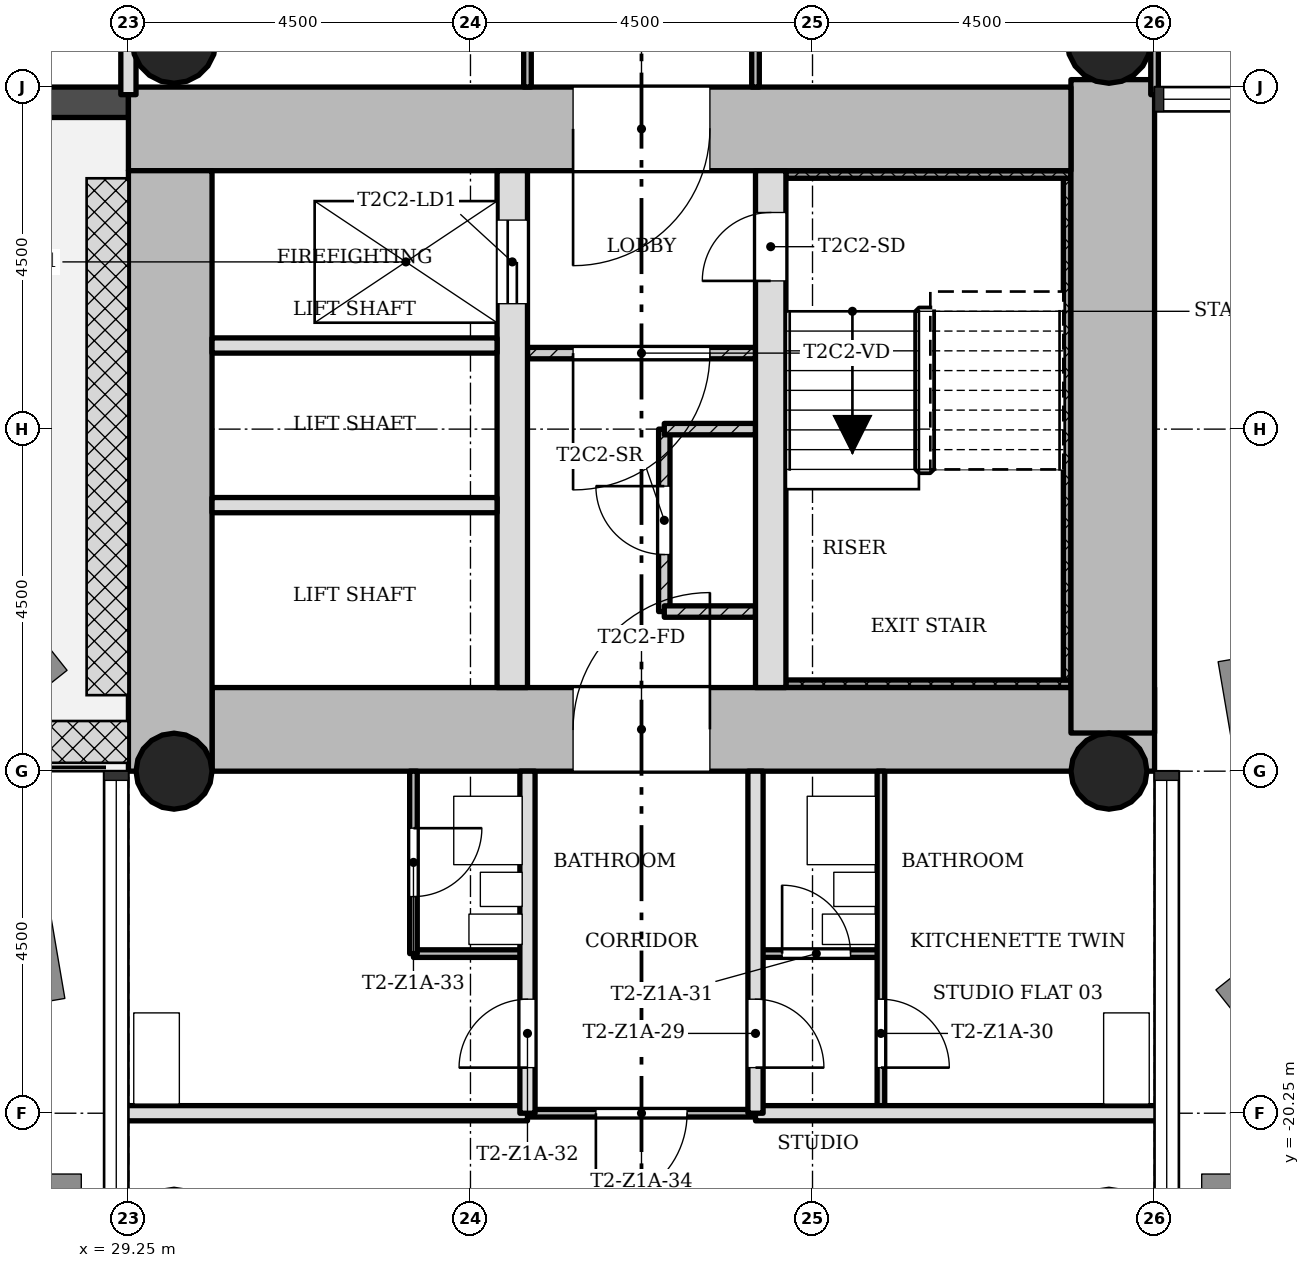
"""IFC4 building model, lengths in metres.
Left out: names, types, materials, properties, quantities, classifications, styles, units other than length and angle.
Written with IfcOpenShell. Run it as: python <this file> out.ifc"""

import sys

from ifc_helpers import new_model, si_unit, direction, frame, frame_2d, origin, origin_2d, place, context, subcontext, project, spatial, rectangle, hollow_circle, extrude, element, fill, save


model = new_model("IFC4")
c1 = context("Model", 3, precision=1e-05, world=origin(), true_north=direction((0.0, 1.0)))
c2 = subcontext(c1, "Body", "Model", "MODEL_VIEW")
j1 = project(units=[si_unit("LENGTHUNIT", "METRE"), si_unit("PLANEANGLEUNIT", "RADIAN")], contexts=[c1])
p1 = place(None, origin())
s1 = spatial("IfcSite", under=j1, at=p1, CompositionType="ELEMENT")
p2 = place(p1, origin())
s2 = spatial("IfcBuilding", under=s1, at=p2, CompositionType="ELEMENT")
p3 = place(p2, frame((0.0, 0.0, 24.5)))
s3 = spatial("IfcBuildingStorey", under=s2, at=p3, CompositionType="ELEMENT", Elevation=24.5)
p4 = place(p3, frame((30.35, -15.2, 0.0), z_axis=(0.0, 0.0, 1.0), x_axis=(1.0, 0.0, 0.0)))
e1 = element("IfcWall", 1, at=p4, inside=s3, PredefinedType="SHEAR", context=c2, shape_type="SweptSolid", body=[
    extrude(rectangle(XDim=12.4, YDim=1.1, at=frame_2d((6.2, 0.0))), origin(), (0.0, 0.0, 1.0), 3.4),
])
p5 = place(p4, frame((4.75, 0.0, 0.0)))
e2 = element("IfcOpeningElement", 2, at=p5, cuts=e1, PredefinedType="OPENING", context=c2, shape_type="SweptSolid", body=[
    extrude(rectangle(XDim=1.8, YDim=2.1, at=frame_2d((0.9, 1.05))), frame((0.0, 0.56, 0.0), z_axis=(0.0, -1.0, 0.0), x_axis=(1.0, 0.0, 0.0)), (0.0, 0.0, 1.0), 1.12),
])
p6 = place(p3, frame((42.2, -15.248, 0.0), z_axis=(0.0, 0.0, 1.0), x_axis=(0.0, 1.0, 0.0)))
e3 = element("IfcWall", 3, at=p6, inside=s3, PredefinedType="SHEAR", context=c2, shape_type="SweptSolid", body=[
    extrude(rectangle(XDim=8.596, YDim=1.1, at=frame_2d((4.298, 0.0))), origin(), (0.0, 0.0, 1.0), 3.4),
])
p7 = place(p3, frame((41.65, -7.3, 0.0), z_axis=(0.0, 0.0, 1.0), x_axis=(-1.0, 0.0, 0.0)))
e4 = element("IfcWall", 4, at=p7, inside=s3, PredefinedType="SHEAR", context=c2, shape_type="SweptSolid", body=[
    extrude(rectangle(XDim=12.4, YDim=1.1, at=frame_2d((6.2, 0.0))), origin(), (0.0, 0.0, 1.0), 3.4),
])
p8 = place(p7, frame((4.75, 0.0, 0.0)))
e5 = element("IfcOpeningElement", 5, at=p8, cuts=e4, PredefinedType="OPENING", context=c2, shape_type="SweptSolid", body=[
    extrude(rectangle(XDim=1.8, YDim=2.1, at=frame_2d((0.9, 1.05))), frame((0.0, 0.56, 0.0), z_axis=(0.0, -1.0, 0.0), x_axis=(1.0, 0.0, 0.0)), (0.0, 0.0, 1.0), 1.12),
])
p9 = place(p3, frame((29.8, -7.85, 0.0), z_axis=(0.0, 0.0, 1.0), x_axis=(0.0, -1.0, 0.0)))
e6 = element("IfcWall", 6, at=p9, inside=s3, PredefinedType="SHEAR", context=c2, shape_type="SweptSolid", body=[
    extrude(rectangle(XDim=7.9, YDim=1.1, at=frame_2d((3.95, 0.0))), origin(), (0.0, 0.0, 1.0), 3.4),
])
p10 = place(p3, frame((34.3, -14.65, 0.0), z_axis=(0.0, 0.0, 1.0), x_axis=(0.0, 1.0, 0.0)))
e7 = element("IfcWall", 7, at=p10, inside=s3, PredefinedType="SHEAR", context=c2, shape_type="SweptSolid", body=[
    extrude(rectangle(XDim=6.8, YDim=0.4, at=frame_2d((3.4, 0.0))), origin(), (0.0, 0.0, 1.0), 3.4),
])
p11 = place(p10, frame((5.05, 0.0, 0.0)))
e8 = element("IfcOpeningElement", 8, at=p11, cuts=e7, PredefinedType="OPENING", context=c2, shape_type="SweptSolid", body=[
    extrude(rectangle(XDim=1.1, YDim=2.1, at=frame_2d((0.55, 1.05))), frame((0.0, 0.21, 0.0), z_axis=(0.0, -1.0, 0.0), x_axis=(1.0, 0.0, 0.0)), (0.0, 0.0, 1.0), 0.42),
])
p12 = place(p3, frame((37.7, -14.65, 0.0), z_axis=(0.0, 0.0, 1.0), x_axis=(0.0, 1.0, 0.0)))
e9 = element("IfcWall", 9, at=p12, inside=s3, PredefinedType="SHEAR", context=c2, shape_type="SweptSolid", body=[
    extrude(rectangle(XDim=6.8, YDim=0.4, at=frame_2d((3.4, 0.0))), origin(), (0.0, 0.0, 1.0), 3.4),
])
p13 = place(p12, frame((5.35, 0.0, 0.0)))
e10 = element("IfcOpeningElement", 10, at=p13, cuts=e9, PredefinedType="OPENING", context=c2, shape_type="SweptSolid", body=[
    extrude(rectangle(XDim=0.9, YDim=2.1, at=frame_2d((0.45, 1.05))), frame((0.0, 0.21, 0.0), z_axis=(0.0, -1.0, 0.0), x_axis=(1.0, 0.0, 0.0)), (0.0, 0.0, 1.0), 0.42),
])
for number, where, z_axis, x_axis in (
    (11, (42.15, -15.75, 0.0), (0.0, 0.0, 1.0), (1.0, 0.0, 0.0)),
    (12, (29.85, -15.75, 0.0), (0.0, 0.0, 1.0), (1.0, 0.0, 0.0)),
):
    element("IfcColumn", number, at=place(p3, frame(where, z_axis=z_axis, x_axis=x_axis)), inside=s3, PredefinedType="COLUMN", context=c2, shape_type="SweptSolid", body=[
        extrude(hollow_circle(Radius=0.5, WallThickness=0.036, at=origin_2d()), origin(), (0.0, 0.0, 1.0), 3.4),
    ])
for number, where, z_axis, x_axis in (
    (13, (42.15, -6.15, 0.0), (0.0, 0.0, 1.0), (1.0, 0.0, 0.0)),
    (14, (29.85, -6.15, 0.0), (0.0, 0.0, 1.0), (1.0, 0.0, 0.0)),
):
    element("IfcColumn", number, at=place(p3, frame(where, z_axis=z_axis, x_axis=x_axis)), inside=s3, PredefinedType="COLUMN", context=c2, shape_type="SweptSolid", body=[
        extrude(hollow_circle(Radius=0.55, WallThickness=0.04, at=origin_2d()), origin(), (0.0, 0.0, 1.0), 3.4),
    ])
p14 = place(p3, frame((24.75, -6.95, 0.0), z_axis=(0.0, 0.0, 1.0), x_axis=(1.0, 0.0, 0.0)))
e15 = element("IfcWall", 15, at=p14, inside=s3, PredefinedType="STANDARD", context=c2, shape_type="SweptSolid", body=[
    extrude(rectangle(XDim=4.5, YDim=0.4, at=frame_2d((2.25, 0.0))), origin(), (0.0, 0.0, 1.0), 3.1),
])
p15 = place(p14, frame((1.35, 0.0, 0.0)))
e16 = element("IfcOpeningElement", 16, at=p15, cuts=e15, PredefinedType="OPENING", context=c2, shape_type="SweptSolid", body=[
    extrude(rectangle(XDim=1.8, YDim=2.1, at=frame_2d((0.9, 1.05))), frame((0.0, 0.21, 0.0), z_axis=(0.0, -1.0, 0.0), x_axis=(1.0, 0.0, 0.0)), (0.0, 0.0, 1.0), 0.42),
])
p16 = place(p3, frame((34.5, -10.25, 0.0), z_axis=(0.0, 0.0, 1.0), x_axis=(1.0, 0.0, 0.0)))
e17 = element("IfcWall", 17, at=p16, inside=s3, PredefinedType="PARTITIONING", context=c2, shape_type="SweptSolid", body=[
    extrude(rectangle(XDim=3.0, YDim=0.15, at=frame_2d((1.5, 0.0))), origin(), (0.0, 0.0, 1.0), 3.0),
])
p17 = place(p16, frame((0.6, 0.0, 0.0)))
e18 = element("IfcOpeningElement", 18, at=p17, cuts=e17, PredefinedType="OPENING", context=c2, shape_type="SweptSolid", body=[
    extrude(rectangle(XDim=1.8, YDim=2.1, at=frame_2d((0.9, 1.05))), frame((0.0, 0.085, 0.0), z_axis=(0.0, -1.0, 0.0), x_axis=(1.0, 0.0, 0.0)), (0.0, 0.0, 1.0), 0.17),
])
for number, where, z_axis, x_axis in (
    (19, (30.35, -10.15, 0.0), (0.0, 0.0, 1.0), (1.0, 0.0, 0.0)),
    (20, (30.35, -12.25, 0.0), (0.0, 0.0, 1.0), (1.0, 0.0, 0.0)),
):
    element("IfcWall", number, at=place(p3, frame(where, z_axis=z_axis, x_axis=x_axis)), inside=s3, PredefinedType="SOLIDWALL", context=c2, shape_type="SweptSolid", body=[
        extrude(rectangle(XDim=3.75, YDim=0.2, at=frame_2d((1.875, 0.0))), origin(), (0.0, 0.0, 1.0), 3.0),
    ])
p18 = place(p3, frame((36.3, -11.25, 0.0), z_axis=(0.0, 0.0, 1.0), x_axis=(0.0, -1.0, 0.0)))
e21 = element("IfcWall", 21, at=p18, inside=s3, PredefinedType="PARTITIONING", context=c2, shape_type="SweptSolid", body=[
    extrude(rectangle(XDim=2.4, YDim=0.15, at=frame_2d((1.2, 0.0))), origin(), (0.0, 0.0, 1.0), 3.0),
])
p19 = place(p18, frame((0.75, 0.0, 0.0)))
e22 = element("IfcOpeningElement", 22, at=p19, cuts=e21, PredefinedType="OPENING", context=c2, shape_type="SweptSolid", body=[
    extrude(rectangle(XDim=0.9, YDim=2.1, at=frame_2d((0.45, 1.05))), frame((0.0, 0.085, 0.0), z_axis=(0.0, -1.0, 0.0), x_axis=(1.0, 0.0, 0.0)), (0.0, 0.0, 1.0), 0.17),
])
for number, where, z_axis, x_axis in (
    (23, (36.3, -11.25, 0.0), (0.0, 0.0, 1.0), (1.0, 0.0, 0.0)),
    (24, (36.3, -13.65, 0.0), (0.0, 0.0, 1.0), (1.0, 0.0, 0.0)),
):
    element("IfcWall", number, at=place(p3, frame(where, z_axis=z_axis, x_axis=x_axis)), inside=s3, PredefinedType="PARTITIONING", context=c2, shape_type="SweptSolid", body=[
        extrude(rectangle(XDim=1.2, YDim=0.15, at=frame_2d((0.6, 0.0))), origin(), (0.0, 0.0, 1.0), 3.0),
    ])
p20 = place(p3, frame((37.5, -20.25, 0.0), z_axis=(0.0, 0.0, 1.0), x_axis=(-1.0, 0.0, 0.0)))
e25 = element("IfcWall", 25, at=p20, inside=s3, PredefinedType="PARTITIONING", context=c2, shape_type="SweptSolid", body=[
    extrude(rectangle(XDim=3.0, YDim=0.1, at=frame_2d((1.5, 0.0))), origin(), (0.0, 0.0, 1.0), 3.0),
])
p21 = place(p20, frame((0.9, 0.0, 0.0)))
e26 = element("IfcOpeningElement", 26, at=p21, cuts=e25, PredefinedType="OPENING", context=c2, shape_type="SweptSolid", body=[
    extrude(rectangle(XDim=1.2, YDim=2.1, at=frame_2d((0.6, 1.05))), frame((0.0, 0.06, 0.0), z_axis=(0.0, -1.0, 0.0), x_axis=(1.0, 0.0, 0.0)), (0.0, 0.0, 1.0), 0.12),
])
for number, where, z_axis, x_axis in (
    (27, (42.85, -20.25, 0.0), (0.0, 0.0, 1.0), (-1.0, 0.0, 0.0)),
    (28, (34.5, -20.25, 0.0), (0.0, 0.0, 1.0), (-1.0, 0.0, 0.0)),
):
    element("IfcWall", number, at=place(p3, frame(where, z_axis=z_axis, x_axis=x_axis)), inside=s3, PredefinedType="SOLIDWALL", context=c2, shape_type="SweptSolid", body=[
        extrude(rectangle(XDim=5.35, YDim=0.2, at=frame_2d((2.675, 0.0))), origin(), (0.0, 0.0, 1.0), 3.0),
    ])
p22 = place(p3, frame((39.15, -18.15, 0.0), z_axis=(0.0, 0.0, 1.0), x_axis=(-1.0, 0.0, 0.0)))
e29 = element("IfcWall", 29, at=p22, inside=s3, PredefinedType="PARTITIONING", context=c2, shape_type="SweptSolid", body=[
    extrude(rectangle(XDim=1.65, YDim=0.1, at=frame_2d((0.825, 0.0))), origin(), (0.0, 0.0, 1.0), 3.0),
])
p23 = place(p22, frame((0.4, 0.0, 0.0)))
e30 = element("IfcOpeningElement", 30, at=p23, cuts=e29, PredefinedType="OPENING", context=c2, shape_type="SweptSolid", body=[
    extrude(rectangle(XDim=0.9, YDim=2.1, at=frame_2d((0.45, 1.05))), frame((0.0, 0.06, 0.0), z_axis=(0.0, -1.0, 0.0), x_axis=(1.0, 0.0, 0.0)), (0.0, 0.0, 1.0), 0.12),
])
p24 = place(p3, frame((34.5, -18.15, 0.0), z_axis=(0.0, 0.0, 1.0), x_axis=(-1.0, 0.0, 0.0)))
e31 = element("IfcWall", 31, at=p24, inside=s3, PredefinedType="PARTITIONING", context=c2, shape_type="SweptSolid", body=[
    extrude(rectangle(XDim=1.5, YDim=0.1, at=frame_2d((0.75, 0.0))), origin(), (0.0, 0.0, 1.0), 3.0),
])
p25 = place(p3, frame((42.75, -6.85, 0.0), z_axis=(0.0, 0.0, 1.0), x_axis=(0.0, 1.0, 0.0)))
e32 = element("IfcWall", 32, at=p25, inside=s3, PredefinedType="PARTITIONING", context=c2, shape_type="SweptSolid", body=[
    extrude(rectangle(XDim=5.95, YDim=0.1, at=frame_2d((2.975, 0.0))), origin(), (0.0, 0.0, 1.0), 3.0),
])
p26 = place(p3, frame((39.15, -20.25, 0.0), z_axis=(0.0, 0.0, 1.0), x_axis=(0.0, 1.0, 0.0)))
e33 = element("IfcWall", 33, at=p26, inside=s3, PredefinedType="PARTITIONING", context=c2, shape_type="SweptSolid", body=[
    extrude(rectangle(XDim=4.5, YDim=0.1, at=frame_2d((2.25, 0.0))), origin(), (0.0, 0.0, 1.0), 3.0),
])
p27 = place(p26, frame((0.6, 0.0, 0.0)))
e34 = element("IfcOpeningElement", 34, at=p27, cuts=e33, PredefinedType="OPENING", context=c2, shape_type="SweptSolid", body=[
    extrude(rectangle(XDim=0.9, YDim=2.1, at=frame_2d((0.45, 1.05))), frame((0.0, 0.06, 0.0), z_axis=(0.0, -1.0, 0.0), x_axis=(1.0, 0.0, 0.0)), (0.0, 0.0, 1.0), 0.12),
])
p28 = place(p3, frame((37.5, -6.75, 0.0), z_axis=(0.0, 0.0, 1.0), x_axis=(0.0, 1.0, 0.0)))
e35 = element("IfcWall", 35, at=p28, inside=s3, PredefinedType="PARTITIONING", context=c2, shape_type="SweptSolid", body=[
    extrude(rectangle(XDim=5.85, YDim=0.1, at=frame_2d((2.925, 0.0))), origin(), (0.0, 0.0, 1.0), 3.0),
])
p29 = place(p28, frame((1.575, 0.0, 0.0)))
e36 = element("IfcOpeningElement", 36, at=p29, cuts=e35, PredefinedType="OPENING", context=c2, shape_type="SweptSolid", body=[
    extrude(rectangle(XDim=0.9, YDim=2.1, at=frame_2d((0.45, 1.05))), frame((0.0, 0.06, 0.0), z_axis=(0.0, -1.0, 0.0), x_axis=(1.0, 0.0, 0.0)), (0.0, 0.0, 1.0), 0.12),
])
p30 = place(p3, frame((37.5, -20.25, 0.0), z_axis=(0.0, 0.0, 1.0), x_axis=(0.0, 1.0, 0.0)))
e37 = element("IfcWall", 37, at=p30, inside=s3, PredefinedType="SOLIDWALL", context=c2, shape_type="SweptSolid", body=[
    extrude(rectangle(XDim=4.5, YDim=0.2, at=frame_2d((2.25, 0.0))), origin(), (0.0, 0.0, 1.0), 3.0),
])
p31 = place(p30, frame((0.6, 0.0, 0.0)))
e38 = element("IfcOpeningElement", 38, at=p31, cuts=e37, PredefinedType="OPENING", context=c2, shape_type="SweptSolid", body=[
    extrude(rectangle(XDim=0.9, YDim=2.1, at=frame_2d((0.45, 1.05))), frame((0.0, 0.11, 0.0), z_axis=(0.0, -1.0, 0.0), x_axis=(1.0, 0.0, 0.0)), (0.0, 0.0, 1.0), 0.22),
])
p32 = place(p3, frame((34.5, -6.75, 0.0), z_axis=(0.0, 0.0, 1.0), x_axis=(0.0, 1.0, 0.0)))
e39 = element("IfcWall", 39, at=p32, inside=s3, PredefinedType="PARTITIONING", context=c2, shape_type="SweptSolid", body=[
    extrude(rectangle(XDim=5.85, YDim=0.1, at=frame_2d((2.925, 0.0))), origin(), (0.0, 0.0, 1.0), 3.0),
])
p33 = place(p32, frame((2.475, 0.0, 0.0)))
e40 = element("IfcOpeningElement", 40, at=p33, cuts=e39, PredefinedType="OPENING", context=c2, shape_type="SweptSolid", body=[
    extrude(rectangle(XDim=0.9, YDim=2.1, at=frame_2d((0.45, 1.05))), frame((0.0, 0.06, 0.0), z_axis=(0.0, -1.0, 0.0), x_axis=(1.0, 0.0, 0.0)), (0.0, 0.0, 1.0), 0.12),
])
p34 = place(p3, frame((34.5, -20.25, 0.0), z_axis=(0.0, 0.0, 1.0), x_axis=(0.0, 1.0, 0.0)))
e41 = element("IfcWall", 41, at=p34, inside=s3, PredefinedType="SOLIDWALL", context=c2, shape_type="SweptSolid", body=[
    extrude(rectangle(XDim=4.5, YDim=0.2, at=frame_2d((2.25, 0.0))), origin(), (0.0, 0.0, 1.0), 3.0),
])
p35 = place(p34, frame((0.6, 0.0, 0.0)))
e42 = element("IfcOpeningElement", 42, at=p35, cuts=e41, PredefinedType="OPENING", context=c2, shape_type="SweptSolid", body=[
    extrude(rectangle(XDim=0.9, YDim=2.1, at=frame_2d((0.45, 1.05))), frame((0.0, 0.11, 0.0), z_axis=(0.0, -1.0, 0.0), x_axis=(1.0, 0.0, 0.0)), (0.0, 0.0, 1.0), 0.22),
])
p36 = place(p3, frame((33.0, -18.15, 0.0), z_axis=(0.0, 0.0, 1.0), x_axis=(0.0, 1.0, 0.0)))
e43 = element("IfcWall", 43, at=p36, inside=s3, PredefinedType="PARTITIONING", context=c2, shape_type="SweptSolid", body=[
    extrude(rectangle(XDim=2.4, YDim=0.1, at=frame_2d((1.2, 0.0))), origin(), (0.0, 0.0, 1.0), 3.0),
])
p37 = place(p36, frame((0.75, 0.0, 0.0)))
e44 = element("IfcOpeningElement", 44, at=p37, cuts=e43, PredefinedType="OPENING", context=c2, shape_type="SweptSolid", body=[
    extrude(rectangle(XDim=0.9, YDim=2.1, at=frame_2d((0.45, 1.05))), frame((0.0, 0.06, 0.0), z_axis=(0.0, -1.0, 0.0), x_axis=(1.0, 0.0, 0.0)), (0.0, 0.0, 1.0), 0.12),
])
p38 = place(p3, frame((29.25, -6.85, 0.0), z_axis=(0.0, 0.0, 1.0), x_axis=(0.0, 1.0, 0.0)))
e45 = element("IfcWall", 45, at=p38, inside=s3, PredefinedType="SOLIDWALL", context=c2, shape_type="SweptSolid", body=[
    extrude(rectangle(XDim=13.7, YDim=0.2, at=frame_2d((6.85, 0.0))), origin(), (0.0, 0.0, 1.0), 3.0),
])
p39 = place(p38, frame((6.4, 0.0, 0.0)))
e46 = element("IfcOpeningElement", 46, at=p39, cuts=e45, PredefinedType="OPENING", context=c2, shape_type="SweptSolid", body=[
    extrude(rectangle(XDim=0.9, YDim=2.1, at=frame_2d((0.45, 1.05))), frame((0.0, 0.11, 0.0), z_axis=(0.0, -1.0, 0.0), x_axis=(1.0, 0.0, 0.0)), (0.0, 0.0, 1.0), 0.22),
])
p40 = place(p3, frame((37.9, -14.6, 0.0), z_axis=(0.0, 0.0, 1.0), x_axis=(1.0, 0.0, 0.0)))
e47 = element("IfcWall", 47, at=p40, inside=s3, PredefinedType="SHEAR", context=c2, shape_type="SweptSolid", body=[
    extrude(rectangle(XDim=3.75, YDim=0.1, at=frame_2d((1.875, 0.0))), origin(), (0.0, 0.0, 1.0), 3.4),
])
p41 = place(p3, frame((41.6, -7.95, 0.0), z_axis=(0.0, 0.0, 1.0), x_axis=(0.0, -1.0, 0.0)))
e48 = element("IfcWall", 48, at=p41, inside=s3, PredefinedType="SHEAR", context=c2, shape_type="SweptSolid", body=[
    extrude(rectangle(XDim=6.6, YDim=0.1, at=frame_2d((3.3, 0.0))), origin(), (0.0, 0.0, 1.0), 3.4),
])
p42 = place(p3, frame((37.9, -7.9, 0.0), z_axis=(0.0, 0.0, 1.0), x_axis=(1.0, 0.0, 0.0)))
e49 = element("IfcWall", 49, at=p42, inside=s3, PredefinedType="SHEAR", context=c2, shape_type="SweptSolid", body=[
    extrude(rectangle(XDim=3.75, YDim=0.1, at=frame_2d((1.875, 0.0))), origin(), (0.0, 0.0, 1.0), 3.4),
])
p43 = place(p17, origin())
e50 = element("IfcDoor", 50, at=p43, inside=s3, OperationType="SINGLE_SWING_LEFT", PredefinedType="DOOR", context=c2, shape_type="SweptSolid", body=[
    extrude(rectangle(XDim=1.8, YDim=2.1, at=frame_2d((0.9, 1.05))), frame((0.0, 0.025, 0.0), z_axis=(0.0, -1.0, 0.0), x_axis=(1.0, 0.0, 0.0)), (0.0, 0.0, 1.0), 0.05),
])
fill(e18, e50)
p44 = place(p19, origin())
e51 = element("IfcDoor", 51, at=p44, inside=s3, OperationType="SINGLE_SWING_LEFT", PredefinedType="DOOR", context=c2, shape_type="SweptSolid", body=[
    extrude(rectangle(XDim=0.9, YDim=2.1, at=frame_2d((0.45, 1.05))), frame((0.0, 0.025, 0.0), z_axis=(0.0, -1.0, 0.0), x_axis=(1.0, 0.0, 0.0)), (0.0, 0.0, 1.0), 0.05),
])
fill(e22, e51)
p45 = place(p31, origin())
e52 = element("IfcDoor", 52, at=p45, inside=s3, OperationType="SINGLE_SWING_LEFT", PredefinedType="DOOR", context=c2, shape_type="SweptSolid", body=[
    extrude(rectangle(XDim=0.9, YDim=2.1, at=frame_2d((0.45, 1.05))), frame((0.0, 0.025, 0.0), z_axis=(0.0, -1.0, 0.0), x_axis=(1.0, 0.0, 0.0)), (0.0, 0.0, 1.0), 0.05),
])
fill(e38, e52)
p46 = place(p27, origin())
e53 = element("IfcDoor", 53, at=p46, inside=s3, OperationType="SINGLE_SWING_LEFT", PredefinedType="DOOR", context=c2, shape_type="SweptSolid", body=[
    extrude(rectangle(XDim=0.9, YDim=2.1, at=frame_2d((0.45, 1.05))), frame((0.0, 0.025, 0.0), z_axis=(0.0, -1.0, 0.0), x_axis=(1.0, 0.0, 0.0)), (0.0, 0.0, 1.0), 0.05),
])
fill(e34, e53)
p47 = place(p23, origin())
e54 = element("IfcDoor", 54, at=p47, inside=s3, OperationType="SINGLE_SWING_RIGHT", PredefinedType="DOOR", context=c2, shape_type="SweptSolid", body=[
    extrude(rectangle(XDim=0.9, YDim=2.1, at=frame_2d((0.45, 1.05))), frame((0.0, 0.025, 0.0), z_axis=(0.0, -1.0, 0.0), x_axis=(1.0, 0.0, 0.0)), (0.0, 0.0, 1.0), 0.05),
])
fill(e30, e54)
p48 = place(p35, origin())
e55 = element("IfcDoor", 55, at=p48, inside=s3, OperationType="SINGLE_SWING_RIGHT", PredefinedType="DOOR", context=c2, shape_type="SweptSolid", body=[
    extrude(rectangle(XDim=0.9, YDim=2.1, at=frame_2d((0.45, 1.05))), frame((0.0, 0.025, 0.0), z_axis=(0.0, -1.0, 0.0), x_axis=(1.0, 0.0, 0.0)), (0.0, 0.0, 1.0), 0.05),
])
fill(e42, e55)
p49 = place(p37, origin())
e56 = element("IfcDoor", 56, at=p49, inside=s3, OperationType="SINGLE_SWING_RIGHT", PredefinedType="DOOR", context=c2, shape_type="SweptSolid", body=[
    extrude(rectangle(XDim=0.9, YDim=2.1, at=frame_2d((0.45, 1.05))), frame((0.0, 0.025, 0.0), z_axis=(0.0, -1.0, 0.0), x_axis=(1.0, 0.0, 0.0)), (0.0, 0.0, 1.0), 0.05),
])
fill(e44, e56)
p50 = place(p21, origin())
e57 = element("IfcDoor", 57, at=p50, inside=s3, OperationType="SINGLE_SWING_LEFT", PredefinedType="DOOR", context=c2, shape_type="SweptSolid", body=[
    extrude(rectangle(XDim=1.2, YDim=2.1, at=frame_2d((0.6, 1.05))), frame((0.0, 0.025, 0.0), z_axis=(0.0, -1.0, 0.0), x_axis=(1.0, 0.0, 0.0)), (0.0, 0.0, 1.0), 0.05),
])
fill(e26, e57)
p51 = place(p13, origin())
e58 = element("IfcDoor", 58, at=p51, inside=s3, OperationType="SINGLE_SWING_RIGHT", PredefinedType="DOOR", context=c2, shape_type="SweptSolid", body=[
    extrude(rectangle(XDim=0.9, YDim=2.1, at=frame_2d((0.45, 1.05))), frame((0.0, 0.025, 0.0), z_axis=(0.0, -1.0, 0.0), x_axis=(1.0, 0.0, 0.0)), (0.0, 0.0, 1.0), 0.05),
])
fill(e10, e58)
p52 = place(p11, origin())
e59 = element("IfcDoor", 59, at=p52, inside=s3, OperationType="SLIDING_TO_LEFT", PredefinedType="DOOR", context=c2, shape_type="SweptSolid", body=[
    extrude(rectangle(XDim=1.1, YDim=2.1, at=frame_2d((0.55, 1.05))), frame((0.0, 0.025, 0.0), z_axis=(0.0, -1.0, 0.0), x_axis=(1.0, 0.0, 0.0)), (0.0, 0.0, 1.0), 0.05),
])
fill(e8, e59)
p53 = place(p8, origin())
e60 = element("IfcDoor", 60, at=p53, inside=s3, OperationType="SINGLE_SWING_LEFT", PredefinedType="DOOR", context=c2, shape_type="SweptSolid", body=[
    extrude(rectangle(XDim=1.8, YDim=2.1, at=frame_2d((0.9, 1.05))), frame((0.0, 0.025, 0.0), z_axis=(0.0, -1.0, 0.0), x_axis=(1.0, 0.0, 0.0)), (0.0, 0.0, 1.0), 0.05),
])
fill(e5, e60)
p54 = place(p5, origin())
e61 = element("IfcDoor", 61, at=p54, inside=s3, OperationType="SINGLE_SWING_LEFT", PredefinedType="DOOR", context=c2, shape_type="SweptSolid", body=[
    extrude(rectangle(XDim=1.8, YDim=2.1, at=frame_2d((0.9, 1.05))), frame((0.0, 0.025, 0.0), z_axis=(0.0, -1.0, 0.0), x_axis=(1.0, 0.0, 0.0)), (0.0, 0.0, 1.0), 0.05),
])
fill(e2, e61)
save(model, sys.argv[1])
